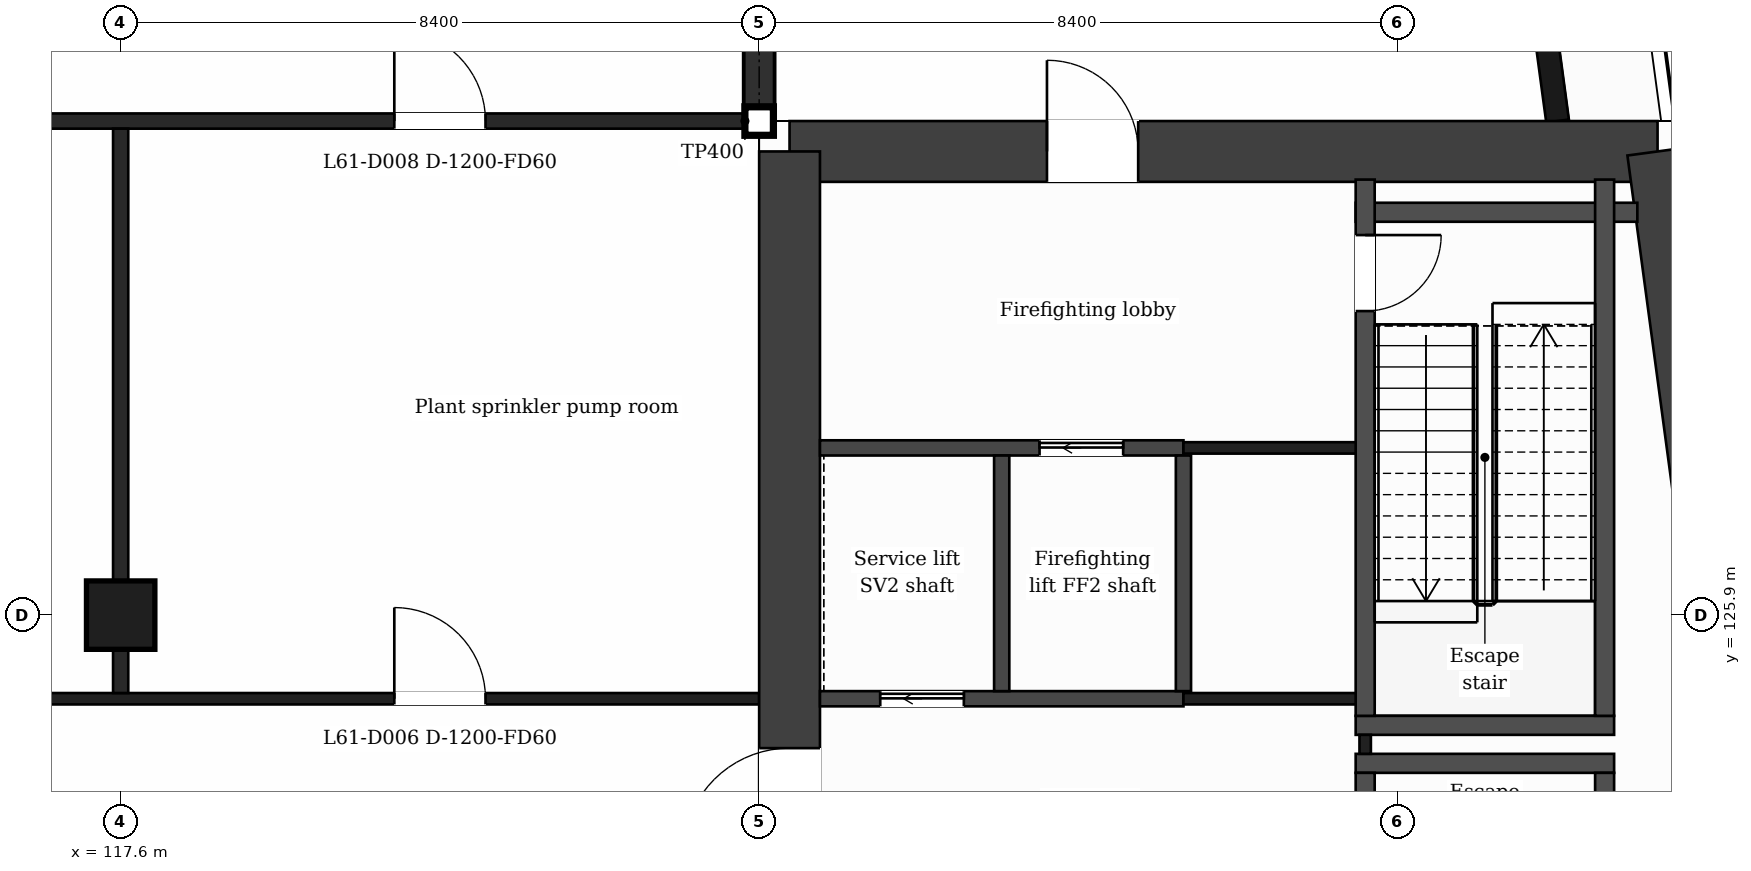
"""IFC4 building model, lengths in metres.
Left out: names, types, materials, properties, quantities, classifications, styles, units other than length and angle.
Written with IfcOpenShell. Run it as: python <this file> out.ifc"""

import sys

from ifc_helpers import new_model, si_unit, direction, frame, frame_2d, origin, origin_2d, place, context, subcontext, project, spatial, rectangle, extrude, element, fill, save


model = new_model("IFC4")
c1 = context("Model", 3, precision=1e-05, world=origin(), true_north=direction((0.0, 1.0)))
c2 = subcontext(c1, "Body", "Model", "MODEL_VIEW")
j1 = project(units=[si_unit("LENGTHUNIT", "METRE"), si_unit("PLANEANGLEUNIT", "RADIAN")], contexts=[c1])
p1 = place(None, origin())
s1 = spatial("IfcSite", under=j1, at=p1, CompositionType="ELEMENT")
p2 = place(p1, origin())
s2 = spatial("IfcBuilding", under=s1, at=p2, CompositionType="ELEMENT")
p3 = place(p2, frame((0.0, 0.0, 254.0)))
s3 = spatial("IfcBuildingStorey", under=s2, at=p3, CompositionType="ELEMENT", Elevation=254.0)
p4 = place(p3, frame((126.4, 132.0, 0.0), z_axis=(0.0, 0.0, 1.0), x_axis=(1.0, 0.0, 0.0)))
e1 = element("IfcWall", 1, at=p4, inside=s3, PredefinedType="SHEAR", context=c2, shape_type="SweptSolid", body=[
    extrude(rectangle(XDim=11.42, YDim=0.8, at=frame_2d((5.71, 0.0))), origin(), (0.0, 0.0, 1.0), 5.0),
])
p5 = place(p4, frame((3.386, 0.0, 0.0)))
e2 = element("IfcOpeningElement", 2, at=p5, cuts=e1, PredefinedType="OPENING", context=c2, shape_type="SweptSolid", body=[
    extrude(rectangle(XDim=1.2, YDim=2.1, at=frame_2d((0.6, 1.05))), frame((0.0, 0.41, 0.0), z_axis=(0.0, -1.0, 0.0), x_axis=(1.0, 0.0, 0.0)), (0.0, 0.0, 1.0), 0.82),
])
p6 = place(p3, frame((137.82, 132.0, 0.0), z_axis=(0.0, 0.0, 1.0), x_axis=(0.133408347329, -0.991061154956, 0.0)))
e3 = element("IfcWall", 3, at=p6, inside=s3, PredefinedType="SHEAR", context=c2, shape_type="SweptSolid", body=[
    extrude(rectangle(XDim=21.391, YDim=0.8, at=frame_2d((10.696, 0.0))), origin(), (0.0, 0.0, 1.0), 5.0),
])
p7 = place(p3, frame((126.4, 110.8, 0.0), z_axis=(0.0, 0.0, 1.0), x_axis=(0.0, 1.0, 0.0)))
e4 = element("IfcWall", 4, at=p7, inside=s3, PredefinedType="SHEAR", context=c2, shape_type="SweptSolid", body=[
    extrude(rectangle(XDim=21.2, YDim=0.8, at=frame_2d((10.6, 0.0))), origin(), (0.0, 0.0, 1.0), 5.0),
])
p8 = place(p7, frame((1.0, 0.0, 0.0)))
e5 = element("IfcOpeningElement", 5, at=p8, cuts=e4, PredefinedType="OPENING", context=c2, shape_type="SweptSolid", body=[
    extrude(rectangle(XDim=1.2, YDim=2.1, at=frame_2d((0.6, 1.05))), frame((0.0, 0.41, 0.0), z_axis=(0.0, -1.0, 0.0), x_axis=(1.0, 0.0, 0.0)), (0.0, 0.0, 1.0), 0.82),
])
p9 = place(p7, frame((11.95, 0.0, 0.0)))
e6 = element("IfcOpeningElement", 6, at=p9, cuts=e4, PredefinedType="OPENING", context=c2, shape_type="SweptSolid", body=[
    extrude(rectangle(XDim=1.4, YDim=2.1, at=frame_2d((0.7, 1.05))), frame((0.0, 0.41, 0.0), z_axis=(0.0, -1.0, 0.0), x_axis=(1.0, 0.0, 0.0)), (0.0, 0.0, 1.0), 0.82),
])
p10 = place(p3, frame((117.6, 125.9, 0.0), z_axis=(0.0, 0.0, 1.0), x_axis=(1.0, 0.0, 0.0)))
e7 = element("IfcColumn", 7, at=p10, inside=s3, PredefinedType="COLUMN", context=c2, shape_type="SweptSolid", body=[
    extrude(rectangle(XDim=0.9, YDim=0.9, at=origin_2d()), origin(), (0.0, 0.0, 1.0), 5.0),
])
p11 = place(p3, frame((136.504, 132.4, 0.0), z_axis=(0.0, 0.0, 1.0), x_axis=(-0.133399697462, 0.99106231929, 0.0)))
e8 = element("IfcWall", 8, at=p11, inside=s3, PredefinedType="SOLIDWALL", context=c2, shape_type="SweptSolid", body=[
    extrude(rectangle(XDim=6.74, YDim=0.3, at=frame_2d((3.37, 0.0))), origin(), (0.0, 0.0, 1.0), 4.68),
])
p12 = place(p11, frame((1.115, 0.0, 0.0)))
e9 = element("IfcOpeningElement", 9, at=p12, cuts=e8, PredefinedType="OPENING", context=c2, shape_type="SweptSolid", body=[
    extrude(rectangle(XDim=1.2, YDim=2.4, at=frame_2d((0.6, 1.2))), frame((0.0, 0.16, 0.0), z_axis=(0.0, -1.0, 0.0), x_axis=(1.0, 0.0, 0.0)), (0.0, 0.0, 1.0), 0.32),
])
for number, where, z_axis, x_axis in (
    (10, (133.848, 123.95, 0.0), (0.0, 0.0, 1.0), (1.0, 0.0, 0.0)),
    (11, (133.848, 124.45, 0.0), (0.0, 0.0, 1.0), (1.0, 0.0, 0.0)),
):
    element("IfcWall", number, at=place(p3, frame(where, z_axis=z_axis, x_axis=x_axis)), inside=s3, PredefinedType="PARTITIONING", context=c2, shape_type="SweptSolid", body=[
        extrude(rectangle(XDim=3.4, YDim=0.25, at=frame_2d((1.7, 0.0))), origin(), (0.0, 0.0, 1.0), 4.68),
    ])
p13 = place(p3, frame((126.8, 124.8, 0.0), z_axis=(0.0, 0.0, 1.0), x_axis=(1.0, 0.0, 0.0)))
e12 = element("IfcWall", 12, at=p13, inside=s3, PredefinedType="PARTITIONING", context=c2, shape_type="SweptSolid", body=[
    extrude(rectangle(XDim=4.782, YDim=0.2, at=frame_2d((2.391, 0.0))), origin(), (0.0, 0.0, 1.0), 4.68),
])
p14 = place(p13, frame((0.793, 0.0, 0.0)))
e13 = element("IfcOpeningElement", 13, at=p14, cuts=e12, PredefinedType="OPENING", context=c2, shape_type="SweptSolid", body=[
    extrude(rectangle(XDim=1.1, YDim=2.1, at=frame_2d((0.55, 1.05))), frame((0.0, 0.11, 0.0), z_axis=(0.0, -1.0, 0.0), x_axis=(1.0, 0.0, 0.0)), (0.0, 0.0, 1.0), 0.22),
])
p15 = place(p3, frame((131.582, 124.8, 0.0), z_axis=(0.0, 0.0, 1.0), x_axis=(1.0, 0.0, 0.0)))
e14 = element("IfcWall", 14, at=p15, inside=s3, PredefinedType="PARTITIONING", context=c2, shape_type="SweptSolid", body=[
    extrude(rectangle(XDim=2.516, YDim=0.15, at=frame_2d((1.258, 0.0))), origin(), (0.0, 0.0, 1.0), 4.68),
])
p16 = place(p3, frame((100.8, 124.8, 0.0), z_axis=(0.0, 0.0, 1.0), x_axis=(1.0, 0.0, 0.0)))
e15 = element("IfcWall", 15, at=p16, inside=s3, PredefinedType="PARTITIONING", context=c2, shape_type="SweptSolid", body=[
    extrude(rectangle(XDim=25.2, YDim=0.15, at=frame_2d((12.6, 0.0))), origin(), (0.0, 0.0, 1.0), 4.68),
])
p17 = place(p16, frame((3.6, 0.0, 0.0)))
e16 = element("IfcOpeningElement", 16, at=p17, cuts=e15, PredefinedType="OPENING", context=c2, shape_type="SweptSolid", body=[
    extrude(rectangle(XDim=1.2, YDim=2.1, at=frame_2d((0.6, 1.05))), frame((0.0, 0.085, 0.0), z_axis=(0.0, -1.0, 0.0), x_axis=(1.0, 0.0, 0.0)), (0.0, 0.0, 1.0), 0.17),
])
p18 = place(p16, frame((12.0, 0.0, 0.0)))
e17 = element("IfcOpeningElement", 17, at=p18, cuts=e15, PredefinedType="OPENING", context=c2, shape_type="SweptSolid", body=[
    extrude(rectangle(XDim=1.2, YDim=2.1, at=frame_2d((0.6, 1.05))), frame((0.0, 0.085, 0.0), z_axis=(0.0, -1.0, 0.0), x_axis=(1.0, 0.0, 0.0)), (0.0, 0.0, 1.0), 0.17),
])
p19 = place(p16, frame((20.4, 0.0, 0.0)))
e18 = element("IfcOpeningElement", 18, at=p19, cuts=e15, PredefinedType="OPENING", context=c2, shape_type="SweptSolid", body=[
    extrude(rectangle(XDim=1.2, YDim=2.1, at=frame_2d((0.6, 1.05))), frame((0.0, 0.085, 0.0), z_axis=(0.0, -1.0, 0.0), x_axis=(1.0, 0.0, 0.0)), (0.0, 0.0, 1.0), 0.17),
])
p20 = place(p3, frame((126.8, 128.1, 0.0), z_axis=(0.0, 0.0, 1.0), x_axis=(1.0, 0.0, 0.0)))
e19 = element("IfcWall", 19, at=p20, inside=s3, PredefinedType="PARTITIONING", context=c2, shape_type="SweptSolid", body=[
    extrude(rectangle(XDim=4.782, YDim=0.2, at=frame_2d((2.391, 0.0))), origin(), (0.0, 0.0, 1.0), 4.68),
])
p21 = place(p20, frame((2.889, 0.0, 0.0)))
e20 = element("IfcOpeningElement", 20, at=p21, cuts=e19, PredefinedType="OPENING", context=c2, shape_type="SweptSolid", body=[
    extrude(rectangle(XDim=1.1, YDim=2.1, at=frame_2d((0.55, 1.05))), frame((0.0, 0.11, 0.0), z_axis=(0.0, -1.0, 0.0), x_axis=(1.0, 0.0, 0.0)), (0.0, 0.0, 1.0), 0.22),
])
p22 = place(p3, frame((131.582, 128.1, 0.0), z_axis=(0.0, 0.0, 1.0), x_axis=(1.0, 0.0, 0.0)))
e21 = element("IfcWall", 21, at=p22, inside=s3, PredefinedType="PARTITIONING", context=c2, shape_type="SweptSolid", body=[
    extrude(rectangle(XDim=2.391, YDim=0.15, at=frame_2d((1.195, 0.0))), origin(), (0.0, 0.0, 1.0), 4.68),
])
p23 = place(p3, frame((133.848, 131.2, 0.0), z_axis=(0.0, 0.0, 1.0), x_axis=(1.0, 0.0, 0.0)))
e22 = element("IfcWall", 22, at=p23, inside=s3, PredefinedType="PARTITIONING", context=c2, shape_type="SweptSolid", body=[
    extrude(rectangle(XDim=3.706, YDim=0.25, at=frame_2d((1.853, 0.0))), origin(), (0.0, 0.0, 1.0), 4.68),
])
p24 = place(p3, frame((100.7, 132.4, 0.0), z_axis=(0.0, 0.0, 1.0), x_axis=(1.0, 0.0, 0.0)))
e23 = element("IfcWall", 23, at=p24, inside=s3, PredefinedType="PARTITIONING", context=c2, shape_type="SweptSolid", body=[
    extrude(rectangle(XDim=25.4, YDim=0.2, at=frame_2d((12.7, 0.0))), origin(), (0.0, 0.0, 1.0), 4.68),
])
p25 = place(p24, frame((20.5, 0.0, 0.0)))
e24 = element("IfcOpeningElement", 24, at=p25, cuts=e23, PredefinedType="OPENING", context=c2, shape_type="SweptSolid", body=[
    extrude(rectangle(XDim=1.2, YDim=2.1, at=frame_2d((0.6, 1.05))), frame((0.0, 0.11, 0.0), z_axis=(0.0, -1.0, 0.0), x_axis=(1.0, 0.0, 0.0)), (0.0, 0.0, 1.0), 0.22),
])
p26 = place(p3, frame((117.6, 124.875, 0.0), z_axis=(0.0, 0.0, 1.0), x_axis=(0.0, 1.0, 0.0)))
e25 = element("IfcWall", 25, at=p26, inside=s3, PredefinedType="PARTITIONING", context=c2, shape_type="SweptSolid", body=[
    extrude(rectangle(XDim=7.425, YDim=0.2, at=frame_2d((3.712, 0.0))), origin(), (0.0, 0.0, 1.0), 4.68),
])
p27 = place(p3, frame((126.0, 132.5, 0.0), z_axis=(0.0, 0.0, 1.0), x_axis=(0.0, 1.0, 0.0)))
e26 = element("IfcWall", 26, at=p27, inside=s3, PredefinedType="PARTITIONING", context=c2, shape_type="SweptSolid", body=[
    extrude(rectangle(XDim=10.51, YDim=0.2, at=frame_2d((5.255, 0.0))), origin(), (0.0, 0.0, 1.0), 4.68),
])
for number, where, z_axis, x_axis in (
    (27, (129.191, 124.9, 0.0), (0.0, 0.0, 1.0), (0.0, 1.0, 0.0)),
    (28, (131.582, 124.9, 0.0), (0.0, 0.0, 1.0), (0.0, 1.0, 0.0)),
):
    element("IfcWall", number, at=place(p3, frame(where, z_axis=z_axis, x_axis=x_axis)), inside=s3, PredefinedType="PARTITIONING", context=c2, shape_type="SweptSolid", body=[
        extrude(rectangle(XDim=3.1, YDim=0.2, at=frame_2d((1.55, 0.0))), origin(), (0.0, 0.0, 1.0), 4.68),
    ])
p28 = place(p3, frame((133.973, 124.075, 0.0), z_axis=(0.0, 0.0, 1.0), x_axis=(0.0, 1.0, 0.0)))
e29 = element("IfcWall", 29, at=p28, inside=s3, PredefinedType="PARTITIONING", context=c2, shape_type="SweptSolid", body=[
    extrude(rectangle(XDim=0.25, YDim=0.15, at=frame_2d((0.125, 0.0))), origin(), (0.0, 0.0, 1.0), 4.68),
])
p29 = place(p3, frame((133.973, 116.77, 0.0), z_axis=(0.0, 0.0, 1.0), x_axis=(0.0, 1.0, 0.0)))
e30 = element("IfcWall", 30, at=p29, inside=s3, PredefinedType="PARTITIONING", context=c2, shape_type="SweptSolid", body=[
    extrude(rectangle(XDim=7.055, YDim=0.25, at=frame_2d((3.527, 0.0))), origin(), (0.0, 0.0, 1.0), 4.68),
])
p30 = place(p29, frame((5.755, 0.0, 0.0)))
e31 = element("IfcOpeningElement", 31, at=p30, cuts=e30, PredefinedType="OPENING", context=c2, shape_type="SweptSolid", body=[
    extrude(rectangle(XDim=0.95, YDim=2.1, at=frame_2d((0.475, 1.05))), frame((0.0, 0.135, 0.0), z_axis=(0.0, -1.0, 0.0), x_axis=(1.0, 0.0, 0.0)), (0.0, 0.0, 1.0), 0.27),
])
p31 = place(p3, frame((133.973, 124.575, 0.0), z_axis=(0.0, 0.0, 1.0), x_axis=(0.0, 1.0, 0.0)))
e32 = element("IfcWall", 32, at=p31, inside=s3, PredefinedType="PARTITIONING", context=c2, shape_type="SweptSolid", body=[
    extrude(rectangle(XDim=7.055, YDim=0.25, at=frame_2d((3.527, 0.0))), origin(), (0.0, 0.0, 1.0), 4.68),
])
p32 = place(p31, frame((5.325, 0.0, 0.0)))
e33 = element("IfcOpeningElement", 33, at=p32, cuts=e32, PredefinedType="OPENING", context=c2, shape_type="SweptSolid", body=[
    extrude(rectangle(XDim=1.0, YDim=2.1, at=frame_2d((0.5, 1.05))), frame((0.0, 0.135, 0.0), z_axis=(0.0, -1.0, 0.0), x_axis=(1.0, 0.0, 0.0)), (0.0, 0.0, 1.0), 0.27),
])
for number, where, z_axis, x_axis in (
    (34, (137.123, 116.77, 0.0), (0.0, 0.0, 1.0), (0.0, 1.0, 0.0)),
    (35, (137.123, 124.575, 0.0), (0.0, 0.0, 1.0), (0.0, 1.0, 0.0)),
):
    element("IfcWall", number, at=place(p3, frame(where, z_axis=z_axis, x_axis=x_axis)), inside=s3, PredefinedType="PARTITIONING", context=c2, shape_type="SweptSolid", body=[
        extrude(rectangle(XDim=7.055, YDim=0.25, at=frame_2d((3.527, 0.0))), origin(), (0.0, 0.0, 1.0), 4.68),
    ])
p33 = place(p19, origin())
e36 = element("IfcDoor", 36, at=p33, inside=s3, OperationType="SINGLE_SWING_LEFT", PredefinedType="DOOR", context=c2, shape_type="SweptSolid", body=[
    extrude(rectangle(XDim=1.2, YDim=2.1, at=frame_2d((0.6, 1.05))), frame((0.0, 0.025, 0.0), z_axis=(0.0, -1.0, 0.0), x_axis=(1.0, 0.0, 0.0)), (0.0, 0.0, 1.0), 0.05),
])
fill(e18, e36)
p34 = place(p25, origin())
e37 = element("IfcDoor", 37, at=p34, inside=s3, OperationType="SINGLE_SWING_LEFT", PredefinedType="DOOR", context=c2, shape_type="SweptSolid", body=[
    extrude(rectangle(XDim=1.2, YDim=2.1, at=frame_2d((0.6, 1.05))), frame((0.0, 0.025, 0.0), z_axis=(0.0, -1.0, 0.0), x_axis=(1.0, 0.0, 0.0)), (0.0, 0.0, 1.0), 0.05),
])
fill(e24, e37)
p35 = place(p21, origin())
e38 = element("IfcDoor", 38, at=p35, inside=s3, OperationType="SLIDING_TO_LEFT", PredefinedType="DOOR", context=c2, shape_type="SweptSolid", body=[
    extrude(rectangle(XDim=1.1, YDim=2.1, at=frame_2d((0.55, 1.05))), frame((0.0, 0.025, 0.0), z_axis=(0.0, -1.0, 0.0), x_axis=(1.0, 0.0, 0.0)), (0.0, 0.0, 1.0), 0.05),
])
fill(e20, e38)
p36 = place(p14, origin())
e39 = element("IfcDoor", 39, at=p36, inside=s3, OperationType="SLIDING_TO_LEFT", PredefinedType="DOOR", context=c2, shape_type="SweptSolid", body=[
    extrude(rectangle(XDim=1.1, YDim=2.1, at=frame_2d((0.55, 1.05))), frame((0.0, 0.025, 0.0), z_axis=(0.0, -1.0, 0.0), x_axis=(1.0, 0.0, 0.0)), (0.0, 0.0, 1.0), 0.05),
])
fill(e13, e39)
p37 = place(p32, origin())
e40 = element("IfcDoor", 40, at=p37, inside=s3, OperationType="SINGLE_SWING_RIGHT", PredefinedType="DOOR", context=c2, shape_type="SweptSolid", body=[
    extrude(rectangle(XDim=1.0, YDim=2.1, at=frame_2d((0.5, 1.05))), frame((0.0, 0.025, 0.0), z_axis=(0.0, -1.0, 0.0), x_axis=(1.0, 0.0, 0.0)), (0.0, 0.0, 1.0), 0.05),
])
fill(e33, e40)
p38 = place(p5, origin())
e41 = element("IfcDoor", 41, at=p38, inside=s3, OperationType="SINGLE_SWING_LEFT", PredefinedType="DOOR", context=c2, shape_type="SweptSolid", body=[
    extrude(rectangle(XDim=1.2, YDim=2.1, at=frame_2d((0.6, 1.05))), frame((0.0, 0.025, 0.0), z_axis=(0.0, -1.0, 0.0), x_axis=(1.0, 0.0, 0.0)), (0.0, 0.0, 1.0), 0.05),
])
fill(e2, e41)
p39 = place(p9, origin())
e42 = element("IfcDoor", 42, at=p39, inside=s3, OperationType="SINGLE_SWING_LEFT", PredefinedType="DOOR", context=c2, shape_type="SweptSolid", body=[
    extrude(rectangle(XDim=1.4, YDim=2.1, at=frame_2d((0.7, 1.05))), frame((0.0, 0.025, 0.0), z_axis=(0.0, -1.0, 0.0), x_axis=(1.0, 0.0, 0.0)), (0.0, 0.0, 1.0), 0.05),
])
fill(e6, e42)
save(model, sys.argv[1])
